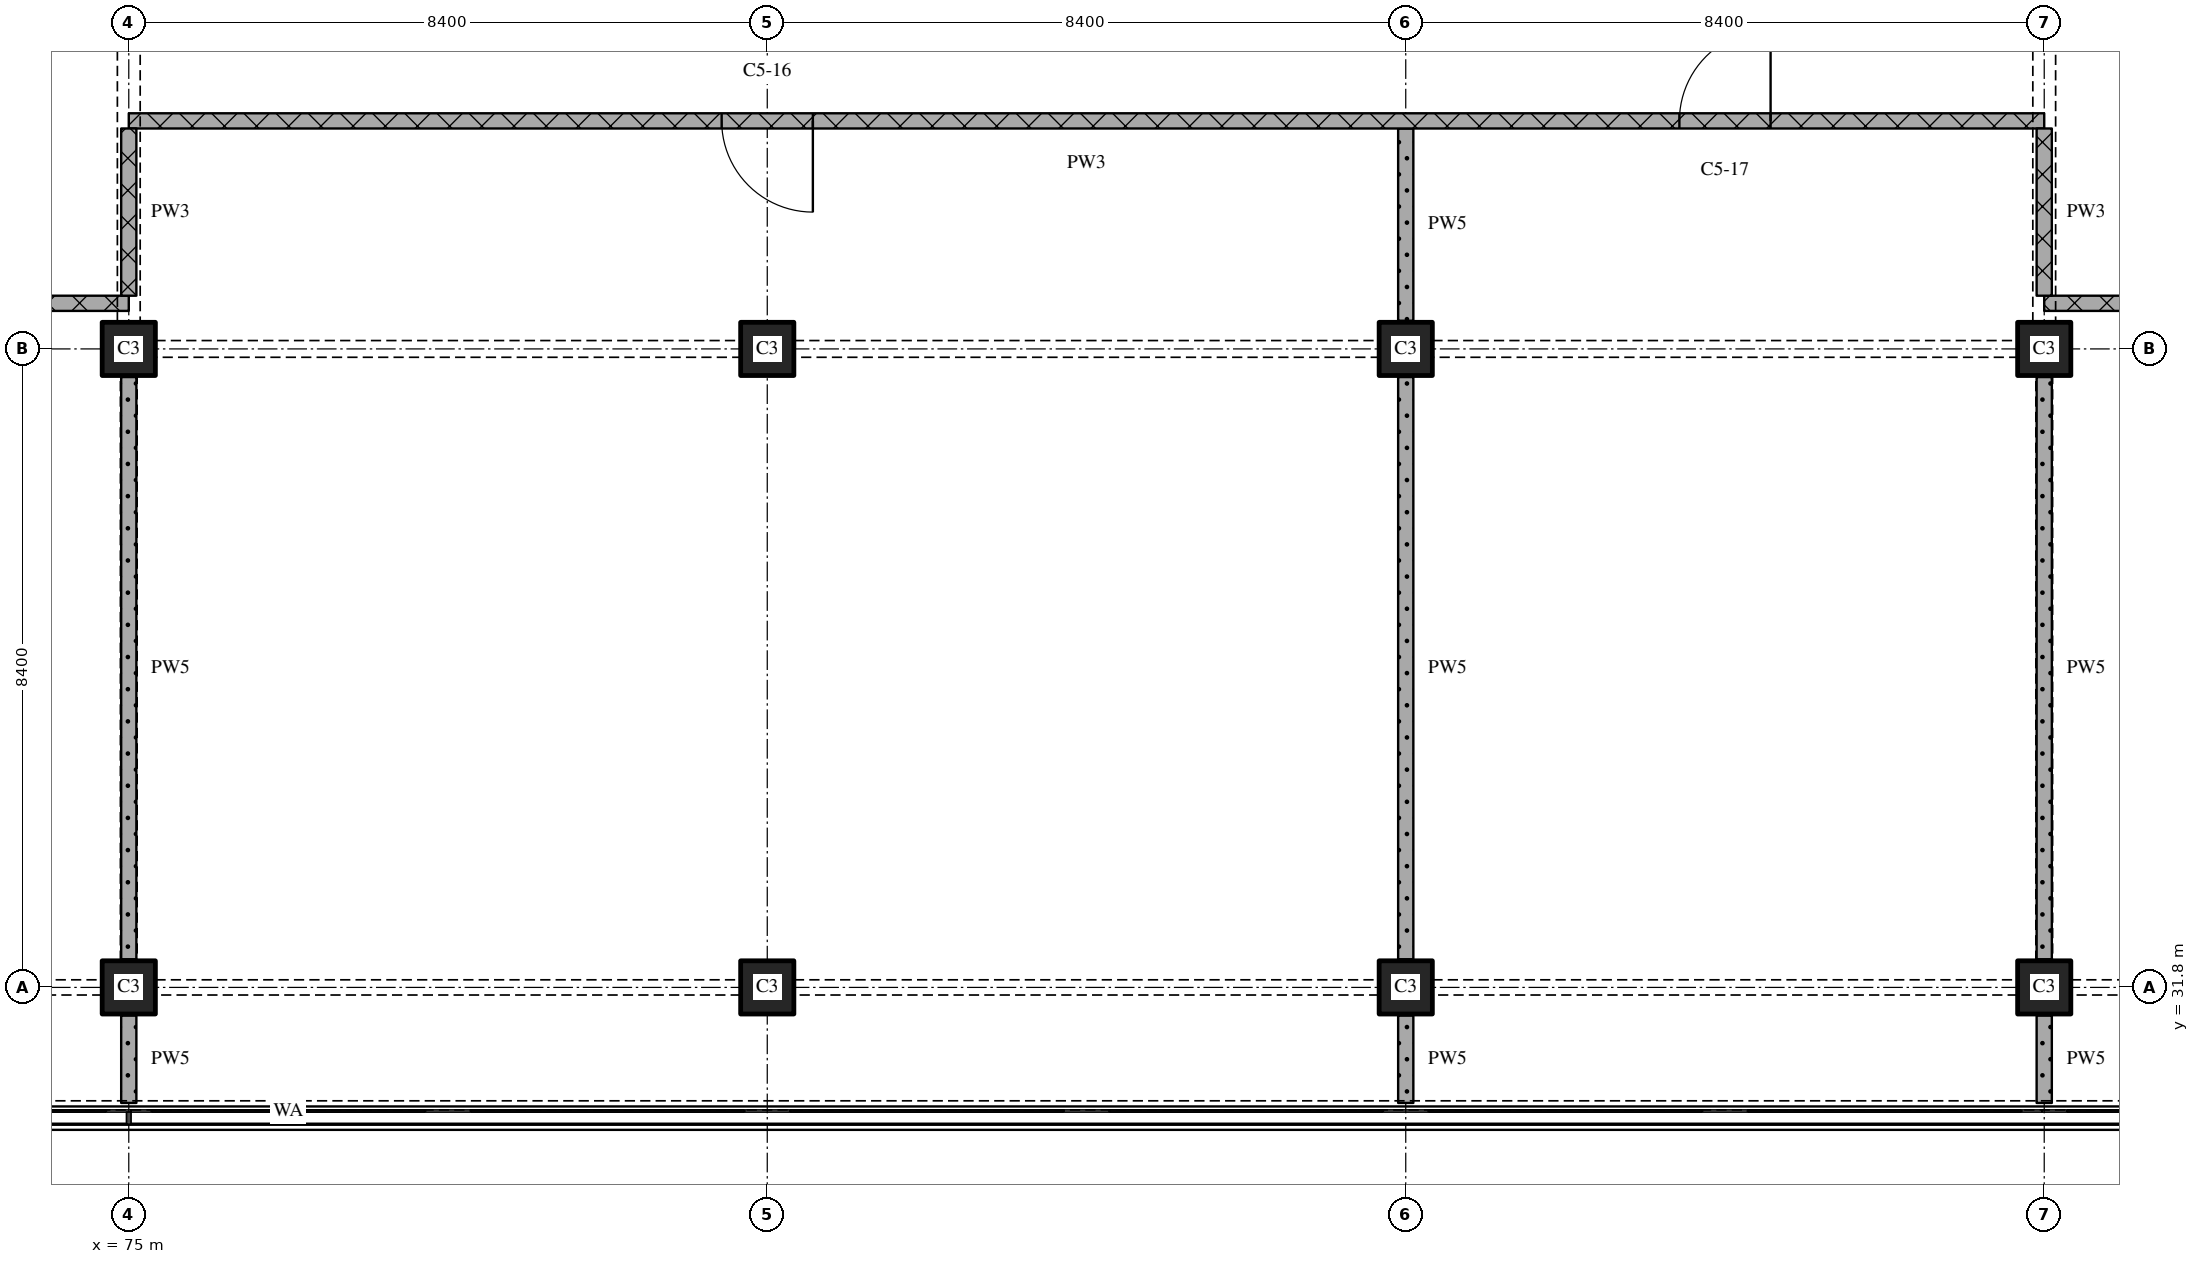
"""IFC4 building model, lengths in metres.
Left out: names, types, materials, properties, quantities, classifications, styles, units other than length and angle.
Written with IfcOpenShell. Run it as: python <this file> out.ifc"""

import sys

from ifc_helpers import new_model, si_unit, direction, frame, frame_2d, origin, origin_2d, place, context, subcontext, project, spatial, rectangle, extrude, element, fill, save


model = new_model("IFC4")
c1 = context("Model", 3, precision=1e-05, world=origin(), true_north=direction((0.0, 1.0)))
c2 = subcontext(c1, "Body", "Model", "MODEL_VIEW")
j1 = project(units=[si_unit("LENGTHUNIT", "METRE"), si_unit("PLANEANGLEUNIT", "RADIAN")], contexts=[c1])
p1 = place(None, origin())
s1 = spatial("IfcSite", under=j1, at=p1, CompositionType="ELEMENT")
p2 = place(p1, origin())
s2 = spatial("IfcBuilding", under=s1, at=p2, CompositionType="ELEMENT")
p3 = place(p2, frame((0.0, 0.0, 190.65)))
s3 = spatial("IfcBuildingStorey", under=s2, at=p3, CompositionType="ELEMENT", Elevation=190.65)
for number, where, z_axis, x_axis in (
    (1, (75.0, 31.8, 0.0), (0.0, 0.0, 1.0), (1.0, 0.0, 0.0)),
    (2, (75.0, 40.2, 0.0), (0.0, 0.0, 1.0), (1.0, 0.0, 0.0)),
    (3, (83.4, 31.8, 0.0), (0.0, 0.0, 1.0), (1.0, 0.0, 0.0)),
    (4, (83.4, 40.2, 0.0), (0.0, 0.0, 1.0), (1.0, 0.0, 0.0)),
    (5, (91.8, 31.8, 0.0), (0.0, 0.0, 1.0), (1.0, 0.0, 0.0)),
    (6, (91.8, 40.2, 0.0), (0.0, 0.0, 1.0), (1.0, 0.0, 0.0)),
    (7, (100.2, 31.8, 0.0), (0.0, 0.0, 1.0), (1.0, 0.0, 0.0)),
    (8, (100.2, 40.2, 0.0), (0.0, 0.0, 1.0), (1.0, 0.0, 0.0)),
):
    element("IfcColumn", number, at=place(p3, frame(where, z_axis=z_axis, x_axis=x_axis)), inside=s3, PredefinedType="COLUMN", context=c2, shape_type="SweptSolid", body=[
        extrude(rectangle(XDim=0.7, YDim=0.7, at=origin_2d()), origin(), (0.0, 0.0, 1.0), 3.6),
    ])
p4 = place(p3, frame((75.0, 40.8, 0.0), z_axis=(0.0, 0.0, 1.0), x_axis=(-1.0, 0.0, 0.0)))
e9 = element("IfcWall", 9, at=p4, inside=s3, PredefinedType="PARTITIONING", context=c2, shape_type="SweptSolid", body=[
    extrude(rectangle(XDim=24.28, YDim=0.2, at=frame_2d((12.14, 0.0))), origin(), (0.0, 0.0, 1.0), 3.3),
])
p5 = place(p4, frame((6.75, 0.0, 0.0)))
e10 = element("IfcOpeningElement", 10, at=p5, cuts=e9, PredefinedType="OPENING", context=c2, shape_type="SweptSolid", body=[
    extrude(rectangle(XDim=1.2, YDim=2.1, at=frame_2d((0.6, 1.05))), frame((0.0, 0.11, 0.0), z_axis=(0.0, -1.0, 0.0), x_axis=(1.0, 0.0, 0.0)), (0.0, 0.0, 1.0), 0.22),
])
p6 = place(p4, frame((20.728, 0.0, 0.0)))
e11 = element("IfcOpeningElement", 11, at=p6, cuts=e9, PredefinedType="OPENING", context=c2, shape_type="SweptSolid", body=[
    extrude(rectangle(XDim=1.2, YDim=2.1, at=frame_2d((0.6, 1.05))), frame((0.0, 0.11, 0.0), z_axis=(0.0, -1.0, 0.0), x_axis=(1.0, 0.0, 0.0)), (0.0, 0.0, 1.0), 0.22),
])
p7 = place(p3, frame((124.48, 40.8, 0.0), z_axis=(0.0, 0.0, 1.0), x_axis=(-1.0, 0.0, 0.0)))
e12 = element("IfcWall", 12, at=p7, inside=s3, PredefinedType="PARTITIONING", context=c2, shape_type="SweptSolid", body=[
    extrude(rectangle(XDim=24.28, YDim=0.2, at=frame_2d((12.14, 0.0))), origin(), (0.0, 0.0, 1.0), 3.3),
])
p8 = place(p7, frame((2.352, 0.0, 0.0)))
e13 = element("IfcOpeningElement", 13, at=p8, cuts=e12, PredefinedType="OPENING", context=c2, shape_type="SweptSolid", body=[
    extrude(rectangle(XDim=1.2, YDim=2.1, at=frame_2d((0.6, 1.05))), frame((0.0, 0.11, 0.0), z_axis=(0.0, -1.0, 0.0), x_axis=(1.0, 0.0, 0.0)), (0.0, 0.0, 1.0), 0.22),
])
p9 = place(p7, frame((11.08, 0.0, 0.0)))
e14 = element("IfcOpeningElement", 14, at=p9, cuts=e12, PredefinedType="OPENING", context=c2, shape_type="SweptSolid", body=[
    extrude(rectangle(XDim=1.2, YDim=2.1, at=frame_2d((0.6, 1.05))), frame((0.0, 0.11, 0.0), z_axis=(0.0, -1.0, 0.0), x_axis=(1.0, 0.0, 0.0)), (0.0, 0.0, 1.0), 0.22),
])
p10 = place(p7, frame((19.48, 0.0, 0.0)))
e15 = element("IfcOpeningElement", 15, at=p10, cuts=e12, PredefinedType="OPENING", context=c2, shape_type="SweptSolid", body=[
    extrude(rectangle(XDim=1.2, YDim=2.1, at=frame_2d((0.6, 1.05))), frame((0.0, 0.11, 0.0), z_axis=(0.0, -1.0, 0.0), x_axis=(1.0, 0.0, 0.0)), (0.0, 0.0, 1.0), 0.22),
])
p11 = place(p3, frame((100.2, 43.2, 0.0), z_axis=(0.0, 0.0, 1.0), x_axis=(-1.0, 0.0, 0.0)))
e16 = element("IfcWall", 16, at=p11, inside=s3, PredefinedType="PARTITIONING", context=c2, shape_type="SweptSolid", body=[
    extrude(rectangle(XDim=25.2, YDim=0.2, at=frame_2d((12.6, 0.0))), origin(), (0.0, 0.0, 1.0), 3.3),
])
p12 = place(p11, frame((3.6, 0.0, 0.0)))
e17 = element("IfcOpeningElement", 17, at=p12, cuts=e16, PredefinedType="OPENING", context=c2, shape_type="SweptSolid", body=[
    extrude(rectangle(XDim=1.2, YDim=2.1, at=frame_2d((0.6, 1.05))), frame((0.0, 0.11, 0.0), z_axis=(0.0, -1.0, 0.0), x_axis=(1.0, 0.0, 0.0)), (0.0, 0.0, 1.0), 0.22),
])
p13 = place(p11, frame((16.2, 0.0, 0.0)))
e18 = element("IfcOpeningElement", 18, at=p13, cuts=e16, PredefinedType="OPENING", context=c2, shape_type="SweptSolid", body=[
    extrude(rectangle(XDim=1.2, YDim=2.1, at=frame_2d((0.6, 1.05))), frame((0.0, 0.11, 0.0), z_axis=(0.0, -1.0, 0.0), x_axis=(1.0, 0.0, 0.0)), (0.0, 0.0, 1.0), 0.22),
])
p14 = place(p3, frame((75.0, 43.1, 0.0), z_axis=(0.0, 0.0, 1.0), x_axis=(0.0, -1.0, 0.0)))
e19 = element("IfcWall", 19, at=p14, inside=s3, PredefinedType="PARTITIONING", context=c2, shape_type="SweptSolid", body=[
    extrude(rectangle(XDim=2.2, YDim=0.2, at=frame_2d((1.1, 0.0))), origin(), (0.0, 0.0, 1.0), 2.41),
])
p15 = place(p3, frame((75.0, 31.43, 0.0), z_axis=(0.0, 0.0, 1.0), x_axis=(0.0, -1.0, 0.0)))
e20 = element("IfcWall", 20, at=p15, inside=s3, PredefinedType="PARTITIONING", context=c2, shape_type="SweptSolid", body=[
    extrude(rectangle(XDim=1.15, YDim=0.2, at=frame_2d((0.575, 0.0))), origin(), (0.0, 0.0, 1.0), 2.41),
])
p16 = place(p3, frame((75.0, 39.83, 0.0), z_axis=(0.0, 0.0, 1.0), x_axis=(0.0, -1.0, 0.0)))
e21 = element("IfcWall", 21, at=p16, inside=s3, PredefinedType="PARTITIONING", context=c2, shape_type="SweptSolid", body=[
    extrude(rectangle(XDim=7.66, YDim=0.2, at=frame_2d((3.83, 0.0))), origin(), (0.0, 0.0, 1.0), 2.7),
])
p17 = place(p3, frame((91.8, 31.43, 0.0), z_axis=(0.0, 0.0, 1.0), x_axis=(0.0, -1.0, 0.0)))
e22 = element("IfcWall", 22, at=p17, inside=s3, PredefinedType="PARTITIONING", context=c2, shape_type="SweptSolid", body=[
    extrude(rectangle(XDim=1.15, YDim=0.2, at=frame_2d((0.575, 0.0))), origin(), (0.0, 0.0, 1.0), 3.3),
])
p18 = place(p3, frame((91.8, 39.83, 0.0), z_axis=(0.0, 0.0, 1.0), x_axis=(0.0, -1.0, 0.0)))
e23 = element("IfcWall", 23, at=p18, inside=s3, PredefinedType="PARTITIONING", context=c2, shape_type="SweptSolid", body=[
    extrude(rectangle(XDim=7.66, YDim=0.2, at=frame_2d((3.83, 0.0))), origin(), (0.0, 0.0, 1.0), 3.3),
])
p19 = place(p3, frame((91.8, 43.1, 0.0), z_axis=(0.0, 0.0, 1.0), x_axis=(0.0, -1.0, 0.0)))
e24 = element("IfcWall", 24, at=p19, inside=s3, PredefinedType="PARTITIONING", context=c2, shape_type="SweptSolid", body=[
    extrude(rectangle(XDim=2.53, YDim=0.2, at=frame_2d((1.265, 0.0))), origin(), (0.0, 0.0, 1.0), 3.3),
])
p20 = place(p3, frame((100.2, 43.1, 0.0), z_axis=(0.0, 0.0, 1.0), x_axis=(0.0, -1.0, 0.0)))
e25 = element("IfcWall", 25, at=p20, inside=s3, PredefinedType="PARTITIONING", context=c2, shape_type="SweptSolid", body=[
    extrude(rectangle(XDim=2.2, YDim=0.2, at=frame_2d((1.1, 0.0))), origin(), (0.0, 0.0, 1.0), 2.41),
])
p21 = place(p3, frame((100.2, 31.43, 0.0), z_axis=(0.0, 0.0, 1.0), x_axis=(0.0, -1.0, 0.0)))
e26 = element("IfcWall", 26, at=p21, inside=s3, PredefinedType="PARTITIONING", context=c2, shape_type="SweptSolid", body=[
    extrude(rectangle(XDim=1.15, YDim=0.2, at=frame_2d((0.575, 0.0))), origin(), (0.0, 0.0, 1.0), 2.41),
])
p22 = place(p3, frame((100.2, 39.83, 0.0), z_axis=(0.0, 0.0, 1.0), x_axis=(0.0, -1.0, 0.0)))
e27 = element("IfcWall", 27, at=p22, inside=s3, PredefinedType="PARTITIONING", context=c2, shape_type="SweptSolid", body=[
    extrude(rectangle(XDim=7.66, YDim=0.2, at=frame_2d((3.83, 0.0))), origin(), (0.0, 0.0, 1.0), 2.7),
])
p23 = place(p12, origin())
e28 = element("IfcDoor", 28, at=p23, inside=s3, OperationType="SINGLE_SWING_RIGHT", PredefinedType="DOOR", context=c2, shape_type="SweptSolid", body=[
    extrude(rectangle(XDim=1.2, YDim=2.1, at=frame_2d((0.6, 1.05))), frame((0.0, 0.025, 0.0), z_axis=(0.0, -1.0, 0.0), x_axis=(1.0, 0.0, 0.0)), (0.0, 0.0, 1.0), 0.05),
])
fill(e17, e28)
p24 = place(p13, origin())
e29 = element("IfcDoor", 29, at=p24, inside=s3, OperationType="SINGLE_SWING_LEFT", PredefinedType="DOOR", context=c2, shape_type="SweptSolid", body=[
    extrude(rectangle(XDim=1.2, YDim=2.1, at=frame_2d((0.6, 1.05))), frame((0.0, 0.025, 0.0), z_axis=(0.0, -1.0, 0.0), x_axis=(1.0, 0.0, 0.0)), (0.0, 0.0, 1.0), 0.05),
])
fill(e18, e29)
save(model, sys.argv[1])
